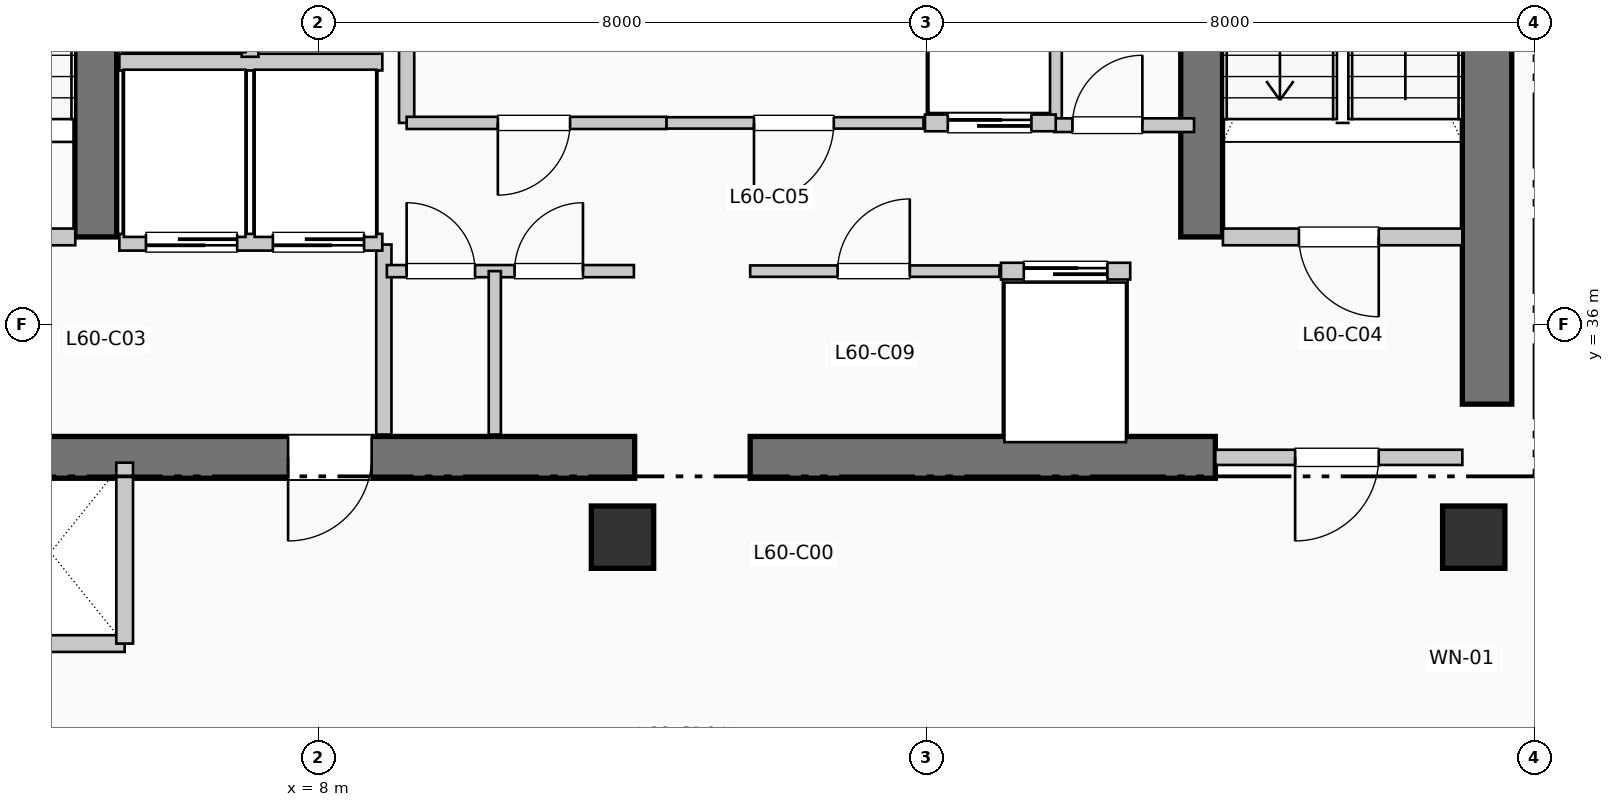
"""IFC4 building model, lengths in metres.
Left out: names, types, materials, properties, quantities, classifications, styles, units other than length and angle.
Written with IfcOpenShell. Run it as: python <this file> out.ifc"""

import sys

from ifc_helpers import new_model, si_unit, direction, frame, frame_2d, origin, origin_2d, place, context, subcontext, project, spatial, rectangle, extrude, element, fill, save


model = new_model("IFC4")
c1 = context("Model", 3, precision=1e-05, world=origin(), true_north=direction((0.0, 1.0)))
c2 = subcontext(c1, "Body", "Model", "MODEL_VIEW")
j1 = project(units=[si_unit("LENGTHUNIT", "METRE"), si_unit("PLANEANGLEUNIT", "RADIAN")], contexts=[c1])
p1 = place(None, origin())
s1 = spatial("IfcSite", under=j1, at=p1, CompositionType="ELEMENT")
p2 = place(p1, origin())
s2 = spatial("IfcBuilding", under=s1, at=p2, CompositionType="ELEMENT")
p3 = place(p2, frame((0.0, 0.0, 247.5)))
s3 = spatial("IfcBuildingStorey", under=s2, at=p3, CompositionType="ELEMENT", Elevation=247.5)
p4 = place(p3, frame((23.375, 34.95, 0.0), z_axis=(0.0, 0.0, 1.0), x_axis=(0.0, 1.0, 0.0)))
e1 = element("IfcWall", 1, at=p4, inside=s3, PredefinedType="SHEAR", context=c2, shape_type="SweptSolid", body=[
    extrude(rectangle(XDim=10.64, YDim=0.65, at=frame_2d((5.32, 0.0))), origin(), (0.0, 0.0, 1.0), 3.96),
])
p5 = place(p3, frame((1.45, 34.25, 0.0), z_axis=(0.0, 0.0, 1.0), x_axis=(1.0, 0.0, 0.0)))
e2 = element("IfcWall", 2, at=p5, inside=s3, PredefinedType="SHEAR", context=c2, shape_type="SweptSolid", body=[
    extrude(rectangle(XDim=10.71, YDim=0.55, at=frame_2d((5.355, 0.0))), origin(), (0.0, 0.0, 1.0), 3.96),
])
p6 = place(p5, frame((7.25, 0.0, 0.0), z_axis=(0.0, 0.0, 1.0), x_axis=(-1.0, 0.0, 0.0)))
e3 = element("IfcOpeningElement", 3, at=p6, cuts=e2, PredefinedType="OPENING", context=c2, shape_type="SweptSolid", body=[
    extrude(rectangle(XDim=1.1, YDim=2.15, at=frame_2d((0.55, 1.075))), frame((0.0, 0.285, 0.0), z_axis=(0.0, -1.0, 0.0), x_axis=(1.0, 0.0, 0.0)), (0.0, 0.0, 1.0), 0.57),
])
p7 = place(p3, frame((13.68, 34.25, 0.0), z_axis=(0.0, 0.0, 1.0), x_axis=(1.0, 0.0, 0.0)))
e4 = element("IfcWall", 4, at=p7, inside=s3, PredefinedType="SHEAR", context=c2, shape_type="SweptSolid", body=[
    extrude(rectangle(XDim=6.12, YDim=0.55, at=frame_2d((3.06, 0.0))), origin(), (0.0, 0.0, 1.0), 3.96),
])
for number, where, z_axis, x_axis in (
    (5, (5.07, 37.15, 0.0), (0.0, 0.0, 1.0), (0.0, 1.0, 0.0)),
    (6, (19.62, 37.15, 0.0), (0.0, 0.0, 1.0), (0.0, 1.0, 0.0)),
):
    element("IfcWall", number, at=place(p3, frame(where, z_axis=z_axis, x_axis=x_axis)), inside=s3, PredefinedType="SHEAR", context=c2, shape_type="SweptSolid", body=[
        extrude(rectangle(XDim=7.89, YDim=0.55, at=frame_2d((3.945, 0.0))), origin(), (0.0, 0.0, 1.0), 3.96),
    ])
for number, where, z_axis, x_axis in (
    (7, (12.0, 33.2, 0.0), (0.0, 0.0, 1.0), (1.0, 0.0, 0.0)),
    (8, (23.2, 33.2, 0.0), (0.0, 0.0, 1.0), (1.0, 0.0, 0.0)),
):
    element("IfcColumn", number, at=place(p3, frame(where, z_axis=z_axis, x_axis=x_axis)), inside=s3, PredefinedType="COLUMN", context=c2, shape_type="SweptSolid", body=[
        extrude(rectangle(XDim=0.82, YDim=0.82, at=origin_2d()), origin(), (0.0, 0.0, 1.0), 3.96),
    ])
p8 = place(p3, frame((1.65, 37.15, 0.0), z_axis=(0.0, 0.0, 1.0), x_axis=(1.0, 0.0, 0.0)))
e9 = element("IfcWall", 9, at=p8, inside=s3, PredefinedType="PARTITIONING", context=c2, shape_type="SweptSolid", body=[
    extrude(rectangle(XDim=3.15, YDim=0.22, at=frame_2d((1.575, 0.0))), origin(), (0.0, 0.0, 1.0), 3.54),
])
p9 = place(p8, frame((2.05, 0.0, 0.0), z_axis=(0.0, 0.0, 1.0), x_axis=(-1.0, 0.0, 0.0)))
e10 = element("IfcOpeningElement", 10, at=p9, cuts=e9, PredefinedType="OPENING", context=c2, shape_type="SweptSolid", body=[
    extrude(rectangle(XDim=1.05, YDim=2.15, at=frame_2d((0.525, 1.075))), frame((0.0, 0.12, 0.0), z_axis=(0.0, -1.0, 0.0), x_axis=(1.0, 0.0, 0.0)), (0.0, 0.0, 1.0), 0.24),
])
p10 = place(p3, frame((8.86, 34.55, 0.0), z_axis=(0.0, 0.0, 1.0), x_axis=(0.0, 1.0, 0.0)))
e11 = element("IfcWall", 11, at=p10, inside=s3, PredefinedType="PARTITIONING", context=c2, shape_type="SweptSolid", body=[
    extrude(rectangle(XDim=2.5, YDim=0.2, at=frame_2d((1.25, 0.0))), origin(), (0.0, 0.0, 1.0), 3.54),
])
p11 = place(p3, frame((19.9, 37.15, 0.0), z_axis=(0.0, 0.0, 1.0), x_axis=(1.0, 0.0, 0.0)))
e12 = element("IfcWall", 12, at=p11, inside=s3, PredefinedType="PARTITIONING", context=c2, shape_type="SweptSolid", body=[
    extrude(rectangle(XDim=3.15, YDim=0.22, at=frame_2d((1.575, 0.0))), origin(), (0.0, 0.0, 1.0), 3.54),
])
p12 = place(p11, frame((2.05, 0.0, 0.0), z_axis=(0.0, 0.0, 1.0), x_axis=(-1.0, 0.0, 0.0)))
e13 = element("IfcOpeningElement", 13, at=p12, cuts=e12, PredefinedType="OPENING", context=c2, shape_type="SweptSolid", body=[
    extrude(rectangle(XDim=1.05, YDim=2.15, at=frame_2d((0.525, 1.075))), frame((0.0, 0.12, 0.0), z_axis=(0.0, -1.0, 0.0), x_axis=(1.0, 0.0, 0.0)), (0.0, 0.0, 1.0), 0.24),
])
p13 = place(p3, frame((19.8, 34.25, 0.0), z_axis=(0.0, 0.0, 1.0), x_axis=(1.0, 0.0, 0.0)))
e14 = element("IfcWall", 14, at=p13, inside=s3, PredefinedType="PARTITIONING", context=c2, shape_type="SweptSolid", body=[
    extrude(rectangle(XDim=3.25, YDim=0.2, at=frame_2d((1.625, 0.0))), origin(), (0.0, 0.0, 1.0), 3.54),
])
p14 = place(p13, frame((2.15, 0.0, 0.0), z_axis=(0.0, 0.0, 1.0), x_axis=(-1.0, 0.0, 0.0)))
e15 = element("IfcOpeningElement", 15, at=p14, cuts=e14, PredefinedType="OPENING", context=c2, shape_type="SweptSolid", body=[
    extrude(rectangle(XDim=1.1, YDim=2.15, at=frame_2d((0.55, 1.075))), frame((0.0, 0.11, 0.0), z_axis=(0.0, -1.0, 0.0), x_axis=(1.0, 0.0, 0.0)), (0.0, 0.0, 1.0), 0.22),
])
p15 = place(p3, frame((5.38, 37.08, 0.0), z_axis=(0.0, 0.0, 1.0), x_axis=(1.0, 0.0, 0.0)))
e16 = element("IfcWall", 16, at=p15, inside=s3, PredefinedType="PARTITIONING", context=c2, shape_type="SweptSolid", body=[
    extrude(rectangle(XDim=3.46, YDim=0.22, at=frame_2d((1.73, 0.0))), origin(), (0.0, 0.0, 1.0), 3.54),
])
p16 = place(p15, frame((1.55, 0.0, 0.0), z_axis=(0.0, 0.0, 1.0), x_axis=(-1.0, 0.0, 0.0)))
e17 = element("IfcOpeningElement", 17, at=p16, cuts=e16, PredefinedType="OPENING", context=c2, shape_type="SweptSolid", body=[
    extrude(rectangle(XDim=1.2, YDim=2.2, at=frame_2d((0.6, 1.1))), frame((0.0, 0.12, 0.0), z_axis=(0.0, -1.0, 0.0), x_axis=(1.0, 0.0, 0.0)), (0.0, 0.0, 1.0), 0.24),
])
p17 = place(p15, frame((3.22, 0.0, 0.0), z_axis=(0.0, 0.0, 1.0), x_axis=(-1.0, 0.0, 0.0)))
e18 = element("IfcOpeningElement", 18, at=p17, cuts=e16, PredefinedType="OPENING", context=c2, shape_type="SweptSolid", body=[
    extrude(rectangle(XDim=1.2, YDim=2.2, at=frame_2d((0.6, 1.1))), frame((0.0, 0.12, 0.0), z_axis=(0.0, -1.0, 0.0), x_axis=(1.0, 0.0, 0.0)), (0.0, 0.0, 1.0), 0.24),
])
p18 = place(p3, frame((5.38, 39.45, 0.0), z_axis=(0.0, 0.0, 1.0), x_axis=(1.0, 0.0, 0.0)))
e19 = element("IfcWall", 19, at=p18, inside=s3, PredefinedType="PARTITIONING", context=c2, shape_type="SweptSolid", body=[
    extrude(rectangle(XDim=3.46, YDim=0.22, at=frame_2d((1.73, 0.0))), origin(), (0.0, 0.0, 1.0), 3.54),
])
p19 = place(p3, frame((7.1, 39.52, 0.0), z_axis=(0.0, 0.0, 1.0), x_axis=(0.0, 1.0, 0.0)))
e20 = element("IfcWall", 20, at=p19, inside=s3, PredefinedType="PARTITIONING", context=c2, shape_type="SweptSolid", body=[
    extrude(rectangle(XDim=2.93, YDim=0.22, at=frame_2d((1.465, 0.0))), origin(), (0.0, 0.0, 1.0), 3.54),
])
p20 = place(p19, frame((0.85, 0.0, 0.0)))
e21 = element("IfcOpeningElement", 21, at=p20, cuts=e20, PredefinedType="OPENING", context=c2, shape_type="SweptSolid", body=[
    extrude(rectangle(XDim=1.1, YDim=2.2, at=frame_2d((0.55, 1.1))), frame((0.0, 0.12, 0.0), z_axis=(0.0, -1.0, 0.0), x_axis=(1.0, 0.0, 0.0)), (0.0, 0.0, 1.0), 0.24),
])
p21 = place(p3, frame((1.55, 31.8, 0.0), z_axis=(0.0, 0.0, 1.0), x_axis=(1.0, 0.0, 0.0)))
e22 = element("IfcWall", 22, at=p21, inside=s3, PredefinedType="PARTITIONING", context=c2, shape_type="SweptSolid", body=[
    extrude(rectangle(XDim=3.9, YDim=0.22, at=frame_2d((1.95, 0.0))), origin(), (0.0, 0.0, 1.0), 3.54),
])
p22 = place(p3, frame((5.45, 31.8, 0.0), z_axis=(0.0, 0.0, 1.0), x_axis=(0.0, 1.0, 0.0)))
e23 = element("IfcWall", 23, at=p22, inside=s3, PredefinedType="PARTITIONING", context=c2, shape_type="SweptSolid", body=[
    extrude(rectangle(XDim=2.38, YDim=0.22, at=frame_2d((1.19, 0.0))), origin(), (0.0, 0.0, 1.0), 3.54),
])
for number, where, z_axis, x_axis in (
    (24, (9.16, 38.65, 0.0), (0.0, 0.0, 1.0), (0.0, 1.0, 0.0)),
    (25, (17.68, 38.65, 0.0), (0.0, 0.0, 1.0), (0.0, 1.0, 0.0)),
):
    element("IfcWall", number, at=place(p3, frame(where, z_axis=z_axis, x_axis=x_axis)), inside=s3, PredefinedType="PARTITIONING", context=c2, shape_type="SweptSolid", body=[
        extrude(rectangle(XDim=2.35, YDim=0.2, at=frame_2d((1.175, 0.0))), origin(), (0.0, 0.0, 1.0), 3.54),
    ])
p23 = place(p3, frame((17.68, 38.62, 0.0), z_axis=(0.0, 0.0, 1.0), x_axis=(1.0, 0.0, 0.0)))
e26 = element("IfcWall", 26, at=p23, inside=s3, PredefinedType="PARTITIONING", context=c2, shape_type="SweptSolid", body=[
    extrude(rectangle(XDim=1.84, YDim=0.18, at=frame_2d((0.92, 0.0))), origin(), (0.0, 0.0, 1.0), 3.54),
])
p24 = place(p23, frame((0.24, 0.0, 0.0)))
e27 = element("IfcOpeningElement", 27, at=p24, cuts=e26, PredefinedType="OPENING", context=c2, shape_type="SweptSolid", body=[
    extrude(rectangle(XDim=0.92, YDim=2.1, at=frame_2d((0.46, 1.05))), frame((0.0, 0.1, 0.0), z_axis=(0.0, -1.0, 0.0), x_axis=(1.0, 0.0, 0.0)), (0.0, 0.0, 1.0), 0.2),
])
p25 = place(p3, frame((8.9, 36.7, 0.0), z_axis=(0.0, 0.0, 1.0), x_axis=(1.0, 0.0, 0.0)))
e28 = element("IfcWall", 28, at=p25, inside=s3, PredefinedType="PARTITIONING", context=c2, shape_type="SweptSolid", body=[
    extrude(rectangle(XDim=3.25, YDim=0.16, at=frame_2d((1.625, 0.0))), origin(), (0.0, 0.0, 1.0), 3.54),
])
p26 = place(p25, frame((0.26, 0.0, 0.0)))
e29 = element("IfcOpeningElement", 29, at=p26, cuts=e28, PredefinedType="OPENING", context=c2, shape_type="SweptSolid", body=[
    extrude(rectangle(XDim=0.9, YDim=2.15, at=frame_2d((0.45, 1.075))), frame((0.0, 0.09, 0.0), z_axis=(0.0, -1.0, 0.0), x_axis=(1.0, 0.0, 0.0)), (0.0, 0.0, 1.0), 0.18),
])
p27 = place(p25, frame((1.68, 0.0, 0.0)))
e30 = element("IfcOpeningElement", 30, at=p27, cuts=e28, PredefinedType="OPENING", context=c2, shape_type="SweptSolid", body=[
    extrude(rectangle(XDim=0.9, YDim=2.15, at=frame_2d((0.45, 1.075))), frame((0.0, 0.09, 0.0), z_axis=(0.0, -1.0, 0.0), x_axis=(1.0, 0.0, 0.0)), (0.0, 0.0, 1.0), 0.18),
])
p28 = place(p3, frame((10.32, 34.55, 0.0), z_axis=(0.0, 0.0, 1.0), x_axis=(0.0, 1.0, 0.0)))
e31 = element("IfcWall", 31, at=p28, inside=s3, PredefinedType="PARTITIONING", context=c2, shape_type="SweptSolid", body=[
    extrude(rectangle(XDim=2.15, YDim=0.16, at=frame_2d((1.075, 0.0))), origin(), (0.0, 0.0, 1.0), 3.54),
])
p29 = place(p3, frame((9.16, 38.65, 0.0), z_axis=(0.0, 0.0, 1.0), x_axis=(1.0, 0.0, 0.0)))
e32 = element("IfcWall", 32, at=p29, inside=s3, PredefinedType="PARTITIONING", context=c2, shape_type="SweptSolid", body=[
    extrude(rectangle(XDim=3.42, YDim=0.16, at=frame_2d((1.71, 0.0))), origin(), (0.0, 0.0, 1.0), 3.54),
])
p30 = place(p29, frame((2.15, 0.0, 0.0), z_axis=(0.0, 0.0, 1.0), x_axis=(-1.0, 0.0, 0.0)))
e33 = element("IfcOpeningElement", 33, at=p30, cuts=e32, PredefinedType="OPENING", context=c2, shape_type="SweptSolid", body=[
    extrude(rectangle(XDim=0.95, YDim=2.15, at=frame_2d((0.475, 1.075))), frame((0.0, 0.09, 0.0), z_axis=(0.0, -1.0, 0.0), x_axis=(1.0, 0.0, 0.0)), (0.0, 0.0, 1.0), 0.18),
])
p31 = place(p3, frame((13.68, 36.7, 0.0), z_axis=(0.0, 0.0, 1.0), x_axis=(1.0, 0.0, 0.0)))
e34 = element("IfcWall", 34, at=p31, inside=s3, PredefinedType="PARTITIONING", context=c2, shape_type="SweptSolid", body=[
    extrude(rectangle(XDim=3.28, YDim=0.15, at=frame_2d((1.64, 0.0))), origin(), (0.0, 0.0, 1.0), 3.54),
])
p32 = place(p31, frame((1.15, 0.0, 0.0)))
e35 = element("IfcOpeningElement", 35, at=p32, cuts=e34, PredefinedType="OPENING", context=c2, shape_type="SweptSolid", body=[
    extrude(rectangle(XDim=0.95, YDim=2.15, at=frame_2d((0.475, 1.075))), frame((0.0, 0.085, 0.0), z_axis=(0.0, -1.0, 0.0), x_axis=(1.0, 0.0, 0.0)), (0.0, 0.0, 1.0), 0.17),
])
p33 = place(p3, frame((12.58, 38.65, 0.0), z_axis=(0.0, 0.0, 1.0), x_axis=(1.0, 0.0, 0.0)))
e36 = element("IfcWall", 36, at=p33, inside=s3, PredefinedType="PARTITIONING", context=c2, shape_type="SweptSolid", body=[
    extrude(rectangle(XDim=3.38, YDim=0.15, at=frame_2d((1.69, 0.0))), origin(), (0.0, 0.0, 1.0), 3.54),
])
p34 = place(p33, frame((2.2, 0.0, 0.0), z_axis=(0.0, 0.0, 1.0), x_axis=(-1.0, 0.0, 0.0)))
e37 = element("IfcOpeningElement", 37, at=p34, cuts=e36, PredefinedType="OPENING", context=c2, shape_type="SweptSolid", body=[
    extrude(rectangle(XDim=1.05, YDim=2.15, at=frame_2d((0.525, 1.075))), frame((0.0, 0.085, 0.0), z_axis=(0.0, -1.0, 0.0), x_axis=(1.0, 0.0, 0.0)), (0.0, 0.0, 1.0), 0.17),
])
p35 = place(p3, frame((16.98, 36.7, 0.0), z_axis=(0.0, 0.0, 1.0), x_axis=(1.0, 0.0, 0.0)))
e38 = element("IfcWall", 38, at=p35, inside=s3, PredefinedType="PARTITIONING", context=c2, shape_type="SweptSolid", body=[
    extrude(rectangle(XDim=1.7, YDim=0.22, at=frame_2d((0.85, 0.0))), origin(), (0.0, 0.0, 1.0), 3.54),
])
p36 = place(p35, frame((0.3, 0.0, 0.0)))
e39 = element("IfcOpeningElement", 39, at=p36, cuts=e38, PredefinedType="OPENING", context=c2, shape_type="SweptSolid", body=[
    extrude(rectangle(XDim=1.1, YDim=2.2, at=frame_2d((0.55, 1.1))), frame((0.0, 0.12, 0.0), z_axis=(0.0, -1.0, 0.0), x_axis=(1.0, 0.0, 0.0)), (0.0, 0.0, 1.0), 0.24),
])
p37 = place(p3, frame((15.98, 38.65, 0.0), z_axis=(0.0, 0.0, 1.0), x_axis=(1.0, 0.0, 0.0)))
e40 = element("IfcWall", 40, at=p37, inside=s3, PredefinedType="PARTITIONING", context=c2, shape_type="SweptSolid", body=[
    extrude(rectangle(XDim=1.72, YDim=0.22, at=frame_2d((0.86, 0.0))), origin(), (0.0, 0.0, 1.0), 3.54),
])
p38 = place(p37, frame((0.3, 0.0, 0.0)))
e41 = element("IfcOpeningElement", 41, at=p38, cuts=e40, PredefinedType="OPENING", context=c2, shape_type="SweptSolid", body=[
    extrude(rectangle(XDim=1.1, YDim=2.2, at=frame_2d((0.55, 1.1))), frame((0.0, 0.12, 0.0), z_axis=(0.0, -1.0, 0.0), x_axis=(1.0, 0.0, 0.0)), (0.0, 0.0, 1.0), 0.24),
])
p39 = place(p6, origin())
e42 = element("IfcDoor", 42, at=p39, inside=s3, OperationType="SINGLE_SWING_LEFT", PredefinedType="DOOR", context=c2, shape_type="SweptSolid", body=[
    extrude(rectangle(XDim=1.1, YDim=2.15, at=frame_2d((0.55, 1.075))), frame((0.0, 0.025, 0.0), z_axis=(0.0, -1.0, 0.0), x_axis=(1.0, 0.0, 0.0)), (0.0, 0.0, 1.0), 0.05),
])
fill(e3, e42)
p40 = place(p12, origin())
e43 = element("IfcDoor", 43, at=p40, inside=s3, OperationType="SINGLE_SWING_RIGHT", PredefinedType="DOOR", context=c2, shape_type="SweptSolid", body=[
    extrude(rectangle(XDim=1.05, YDim=2.15, at=frame_2d((0.525, 1.075))), frame((0.0, 0.025, 0.0), z_axis=(0.0, -1.0, 0.0), x_axis=(1.0, 0.0, 0.0)), (0.0, 0.0, 1.0), 0.05),
])
fill(e13, e43)
p41 = place(p14, origin())
e44 = element("IfcDoor", 44, at=p41, inside=s3, OperationType="SINGLE_SWING_LEFT", PredefinedType="DOOR", context=c2, shape_type="SweptSolid", body=[
    extrude(rectangle(XDim=1.1, YDim=2.15, at=frame_2d((0.55, 1.075))), frame((0.0, 0.025, 0.0), z_axis=(0.0, -1.0, 0.0), x_axis=(1.0, 0.0, 0.0)), (0.0, 0.0, 1.0), 0.05),
])
fill(e15, e44)
p42 = place(p16, origin())
e45 = element("IfcDoor", 45, at=p42, inside=s3, OperationType="SLIDING_TO_RIGHT", PredefinedType="DOOR", context=c2, shape_type="SweptSolid", body=[
    extrude(rectangle(XDim=1.2, YDim=2.2, at=frame_2d((0.6, 1.1))), frame((0.0, 0.025, 0.0), z_axis=(0.0, -1.0, 0.0), x_axis=(1.0, 0.0, 0.0)), (0.0, 0.0, 1.0), 0.05),
])
fill(e17, e45)
p43 = place(p17, origin())
e46 = element("IfcDoor", 46, at=p43, inside=s3, OperationType="SLIDING_TO_RIGHT", PredefinedType="DOOR", context=c2, shape_type="SweptSolid", body=[
    extrude(rectangle(XDim=1.2, YDim=2.2, at=frame_2d((0.6, 1.1))), frame((0.0, 0.025, 0.0), z_axis=(0.0, -1.0, 0.0), x_axis=(1.0, 0.0, 0.0)), (0.0, 0.0, 1.0), 0.05),
])
fill(e18, e46)
p44 = place(p24, origin())
e47 = element("IfcDoor", 47, at=p44, inside=s3, OperationType="SINGLE_SWING_RIGHT", PredefinedType="DOOR", context=c2, shape_type="SweptSolid", body=[
    extrude(rectangle(XDim=0.92, YDim=2.1, at=frame_2d((0.46, 1.05))), frame((0.0, 0.025, 0.0), z_axis=(0.0, -1.0, 0.0), x_axis=(1.0, 0.0, 0.0)), (0.0, 0.0, 1.0), 0.05),
])
fill(e27, e47)
p45 = place(p26, origin())
e48 = element("IfcDoor", 48, at=p45, inside=s3, OperationType="SINGLE_SWING_LEFT", PredefinedType="DOOR", context=c2, shape_type="SweptSolid", body=[
    extrude(rectangle(XDim=0.9, YDim=2.15, at=frame_2d((0.45, 1.075))), frame((0.0, 0.025, 0.0), z_axis=(0.0, -1.0, 0.0), x_axis=(1.0, 0.0, 0.0)), (0.0, 0.0, 1.0), 0.05),
])
fill(e29, e48)
p46 = place(p27, origin())
e49 = element("IfcDoor", 49, at=p46, inside=s3, OperationType="SINGLE_SWING_RIGHT", PredefinedType="DOOR", context=c2, shape_type="SweptSolid", body=[
    extrude(rectangle(XDim=0.9, YDim=2.15, at=frame_2d((0.45, 1.075))), frame((0.0, 0.025, 0.0), z_axis=(0.0, -1.0, 0.0), x_axis=(1.0, 0.0, 0.0)), (0.0, 0.0, 1.0), 0.05),
])
fill(e30, e49)
p47 = place(p30, origin())
e50 = element("IfcDoor", 50, at=p47, inside=s3, OperationType="SINGLE_SWING_LEFT", PredefinedType="DOOR", context=c2, shape_type="SweptSolid", body=[
    extrude(rectangle(XDim=0.95, YDim=2.15, at=frame_2d((0.475, 1.075))), frame((0.0, 0.025, 0.0), z_axis=(0.0, -1.0, 0.0), x_axis=(1.0, 0.0, 0.0)), (0.0, 0.0, 1.0), 0.05),
])
fill(e33, e50)
p48 = place(p32, origin())
e51 = element("IfcDoor", 51, at=p48, inside=s3, OperationType="SINGLE_SWING_RIGHT", PredefinedType="DOOR", context=c2, shape_type="SweptSolid", body=[
    extrude(rectangle(XDim=0.95, YDim=2.15, at=frame_2d((0.475, 1.075))), frame((0.0, 0.025, 0.0), z_axis=(0.0, -1.0, 0.0), x_axis=(1.0, 0.0, 0.0)), (0.0, 0.0, 1.0), 0.05),
])
fill(e35, e51)
p49 = place(p34, origin())
e52 = element("IfcDoor", 52, at=p49, inside=s3, OperationType="SINGLE_SWING_LEFT", PredefinedType="DOOR", context=c2, shape_type="SweptSolid", body=[
    extrude(rectangle(XDim=1.05, YDim=2.15, at=frame_2d((0.525, 1.075))), frame((0.0, 0.025, 0.0), z_axis=(0.0, -1.0, 0.0), x_axis=(1.0, 0.0, 0.0)), (0.0, 0.0, 1.0), 0.05),
])
fill(e37, e52)
p50 = place(p36, origin())
e53 = element("IfcDoor", 53, at=p50, inside=s3, OperationType="SLIDING_TO_LEFT", PredefinedType="DOOR", context=c2, shape_type="SweptSolid", body=[
    extrude(rectangle(XDim=1.1, YDim=2.2, at=frame_2d((0.55, 1.1))), frame((0.0, 0.025, 0.0), z_axis=(0.0, -1.0, 0.0), x_axis=(1.0, 0.0, 0.0)), (0.0, 0.0, 1.0), 0.05),
])
fill(e39, e53)
p51 = place(p38, origin())
e54 = element("IfcDoor", 54, at=p51, inside=s3, OperationType="SLIDING_TO_LEFT", PredefinedType="DOOR", context=c2, shape_type="SweptSolid", body=[
    extrude(rectangle(XDim=1.1, YDim=2.2, at=frame_2d((0.55, 1.1))), frame((0.0, 0.025, 0.0), z_axis=(0.0, -1.0, 0.0), x_axis=(1.0, 0.0, 0.0)), (0.0, 0.0, 1.0), 0.05),
])
fill(e41, e54)
save(model, sys.argv[1])
